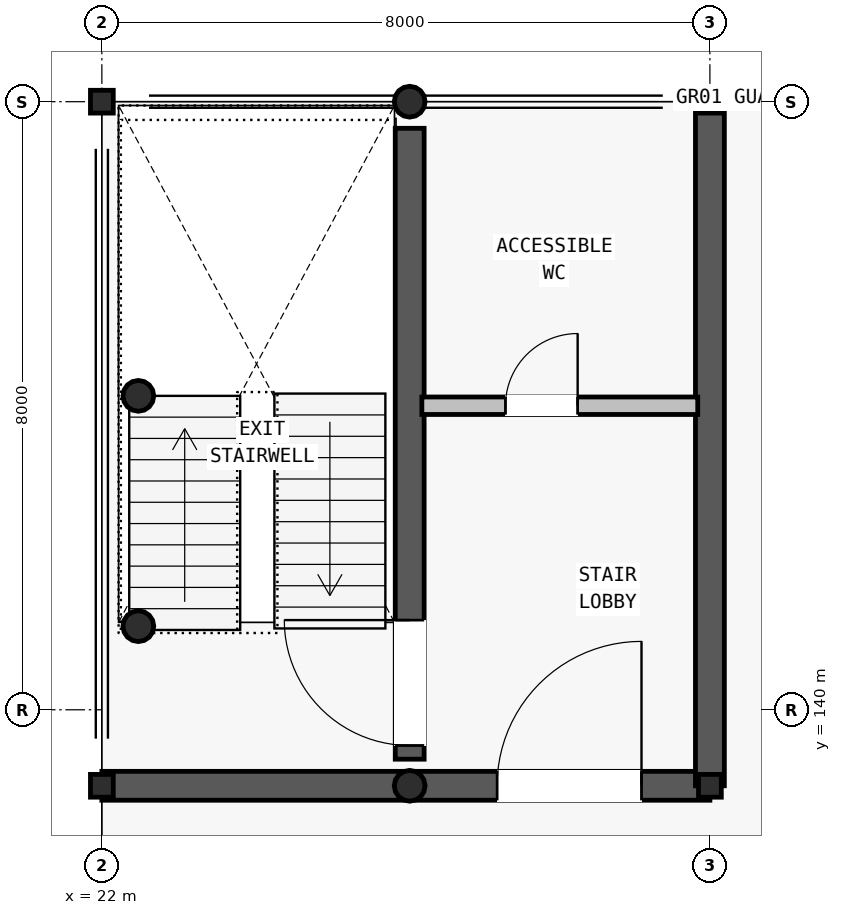
"""IFC4 building model, lengths in metres.
Left out: names, types, materials, properties, quantities, classifications, styles, units other than length and angle.
Written with IfcOpenShell. Run it as: python <this file> out.ifc"""

import sys

from ifc_helpers import new_model, si_unit, direction, frame, frame_2d, origin, origin_2d, place, context, subcontext, project, spatial, rectangle, hollow_circle, i_section, extrude, element, fill, save


model = new_model("IFC4")
c1 = context("Model", 3, precision=1e-05, world=origin(), true_north=direction((0.0, 1.0)))
c2 = subcontext(c1, "Body", "Model", "MODEL_VIEW")
j1 = project(units=[si_unit("LENGTHUNIT", "METRE"), si_unit("PLANEANGLEUNIT", "RADIAN")], contexts=[c1])
p1 = place(None, origin())
s1 = spatial("IfcSite", under=j1, at=p1, CompositionType="ELEMENT")
p2 = place(p1, origin())
s2 = spatial("IfcBuilding", under=s1, at=p2, CompositionType="ELEMENT")
p3 = place(p2, frame((0.0, 0.0, 13.4)))
s3 = spatial("IfcBuildingStorey", under=s2, at=p3, CompositionType="ELEMENT", Elevation=13.4)
for number, where, z_axis, x_axis in (
    (1, (22.0, 148.0, 0.0), (0.0, 0.0, 1.0), (1.0, 0.0, 0.0)),
    (2, (30.0, 148.0, 0.0), (0.0, 0.0, 1.0), (1.0, 0.0, 0.0)),
    (3, (22.0, 139.0, 0.0), (0.0, 0.0, 1.0), (1.0, 0.0, 0.0)),
    (4, (30.0, 139.0, 0.0), (0.0, 0.0, 1.0), (1.0, 0.0, 0.0)),
):
    element("IfcColumn", number, at=place(p3, frame(where, z_axis=z_axis, x_axis=x_axis)), inside=s3, PredefinedType="COLUMN", context=c2, shape_type="SweptSolid", body=[
        extrude(i_section(OverallWidth=0.3, OverallDepth=0.3, WebThickness=0.01, FlangeThickness=0.015, FilletRadius=0.018, at=origin_2d()), origin(), (0.0, 0.0, 1.0), 3.9),
    ])
for number, where, z_axis, x_axis in (
    (5, (26.05, 139.0, 0.0), (0.0, 0.0, 1.0), (1.0, 0.0, 0.0)),
    (6, (26.05, 148.0, 0.0), (0.0, 0.0, 1.0), (1.0, 0.0, 0.0)),
    (7, (22.48, 141.1, 0.0), (0.0, 0.0, 1.0), (1.0, 0.0, 0.0)),
    (8, (22.48, 144.13, 0.0), (0.0, 0.0, 1.0), (1.0, 0.0, 0.0)),
):
    element("IfcColumn", number, at=place(p3, frame(where, z_axis=z_axis, x_axis=x_axis)), inside=s3, PredefinedType="COLUMN", context=c2, shape_type="SweptSolid", body=[
        extrude(hollow_circle(Radius=0.203, WallThickness=0.014, at=origin_2d()), origin(), (0.0, 0.0, 1.0), 3.9),
    ])
p4 = place(p3, frame((22.0, 139.0, 0.0), z_axis=(0.0, 0.0, 1.0), x_axis=(1.0, 0.0, 0.0)))
e9 = element("IfcWall", 9, at=p4, inside=s3, PredefinedType="SHEAR", context=c2, shape_type="SweptSolid", body=[
    extrude(rectangle(XDim=8.0, YDim=0.38, at=frame_2d((4.0, 0.0))), origin(), (0.0, 0.0, 1.0), 3.62),
])
p5 = place(p4, frame((5.2, 0.0, 0.0)))
e10 = element("IfcOpeningElement", 10, at=p5, cuts=e9, PredefinedType="OPENING", context=c2, shape_type="SweptSolid", body=[
    extrude(rectangle(XDim=1.9, YDim=2.3, at=frame_2d((0.95, 1.15))), frame((0.0, 0.2, 0.0), z_axis=(0.0, -1.0, 0.0), x_axis=(1.0, 0.0, 0.0)), (0.0, 0.0, 1.0), 0.4),
])
p6 = place(p3, frame((30.0, 139.0, 0.0), z_axis=(0.0, 0.0, 1.0), x_axis=(0.0, 1.0, 0.0)))
e11 = element("IfcWall", 11, at=p6, inside=s3, PredefinedType="SHEAR", context=c2, shape_type="SweptSolid", body=[
    extrude(rectangle(XDim=9.0, YDim=0.38, at=frame_2d((4.5, 0.0))), origin(), (0.0, 0.0, 1.0), 3.62),
])
p7 = place(p3, frame((26.05, 139.35, 0.0), z_axis=(0.0, 0.0, 1.0), x_axis=(0.0, 1.0, 0.0)))
e12 = element("IfcWall", 12, at=p7, inside=s3, PredefinedType="SHEAR", context=c2, shape_type="SweptSolid", body=[
    extrude(rectangle(XDim=8.3, YDim=0.38, at=frame_2d((4.15, 0.0))), origin(), (0.0, 0.0, 1.0), 3.62),
])
p8 = place(p7, frame((0.18, 0.0, 0.0)))
e13 = element("IfcOpeningElement", 13, at=p8, cuts=e12, PredefinedType="OPENING", context=c2, shape_type="SweptSolid", body=[
    extrude(rectangle(XDim=1.65, YDim=2.2, at=frame_2d((0.825, 1.1))), frame((0.0, 0.2, 0.0), z_axis=(0.0, -1.0, 0.0), x_axis=(1.0, 0.0, 0.0)), (0.0, 0.0, 1.0), 0.4),
])
p9 = place(p3, frame((26.21, 144.0, 0.0), z_axis=(0.0, 0.0, 1.0), x_axis=(1.0, 0.0, 0.0)))
e14 = element("IfcWall", 14, at=p9, inside=s3, PredefinedType="PARTITIONING", context=c2, shape_type="SweptSolid", body=[
    extrude(rectangle(XDim=3.63, YDim=0.23, at=frame_2d((1.815, 0.0))), origin(), (0.0, 0.0, 1.0), 2.48),
])
p10 = place(p9, frame((1.1, 0.0, 0.0)))
e15 = element("IfcOpeningElement", 15, at=p10, cuts=e14, PredefinedType="OPENING", context=c2, shape_type="SweptSolid", body=[
    extrude(rectangle(XDim=0.95, YDim=2.1, at=frame_2d((0.475, 1.05))), frame((0.0, 0.125, 0.0), z_axis=(0.0, -1.0, 0.0), x_axis=(1.0, 0.0, 0.0)), (0.0, 0.0, 1.0), 0.25),
])
p11 = place(p5, origin())
e16 = element("IfcDoor", 16, at=p11, inside=s3, OperationType="SINGLE_SWING_RIGHT", PredefinedType="DOOR", context=c2, shape_type="SweptSolid", body=[
    extrude(rectangle(XDim=1.9, YDim=2.3, at=frame_2d((0.95, 1.15))), frame((0.0, 0.025, 0.0), z_axis=(0.0, -1.0, 0.0), x_axis=(1.0, 0.0, 0.0)), (0.0, 0.0, 1.0), 0.05),
])
fill(e10, e16)
p12 = place(p8, origin())
e17 = element("IfcDoor", 17, at=p12, inside=s3, OperationType="SINGLE_SWING_RIGHT", PredefinedType="DOOR", context=c2, shape_type="SweptSolid", body=[
    extrude(rectangle(XDim=1.65, YDim=2.2, at=frame_2d((0.825, 1.1))), frame((0.0, 0.025, 0.0), z_axis=(0.0, -1.0, 0.0), x_axis=(1.0, 0.0, 0.0)), (0.0, 0.0, 1.0), 0.05),
])
fill(e13, e17)
p13 = place(p10, origin())
e18 = element("IfcDoor", 18, at=p13, inside=s3, OperationType="SINGLE_SWING_RIGHT", PredefinedType="DOOR", context=c2, shape_type="SweptSolid", body=[
    extrude(rectangle(XDim=0.95, YDim=2.1, at=frame_2d((0.475, 1.05))), frame((0.0, 0.025, 0.0), z_axis=(0.0, -1.0, 0.0), x_axis=(1.0, 0.0, 0.0)), (0.0, 0.0, 1.0), 0.05),
])
fill(e15, e18)
save(model, sys.argv[1])
